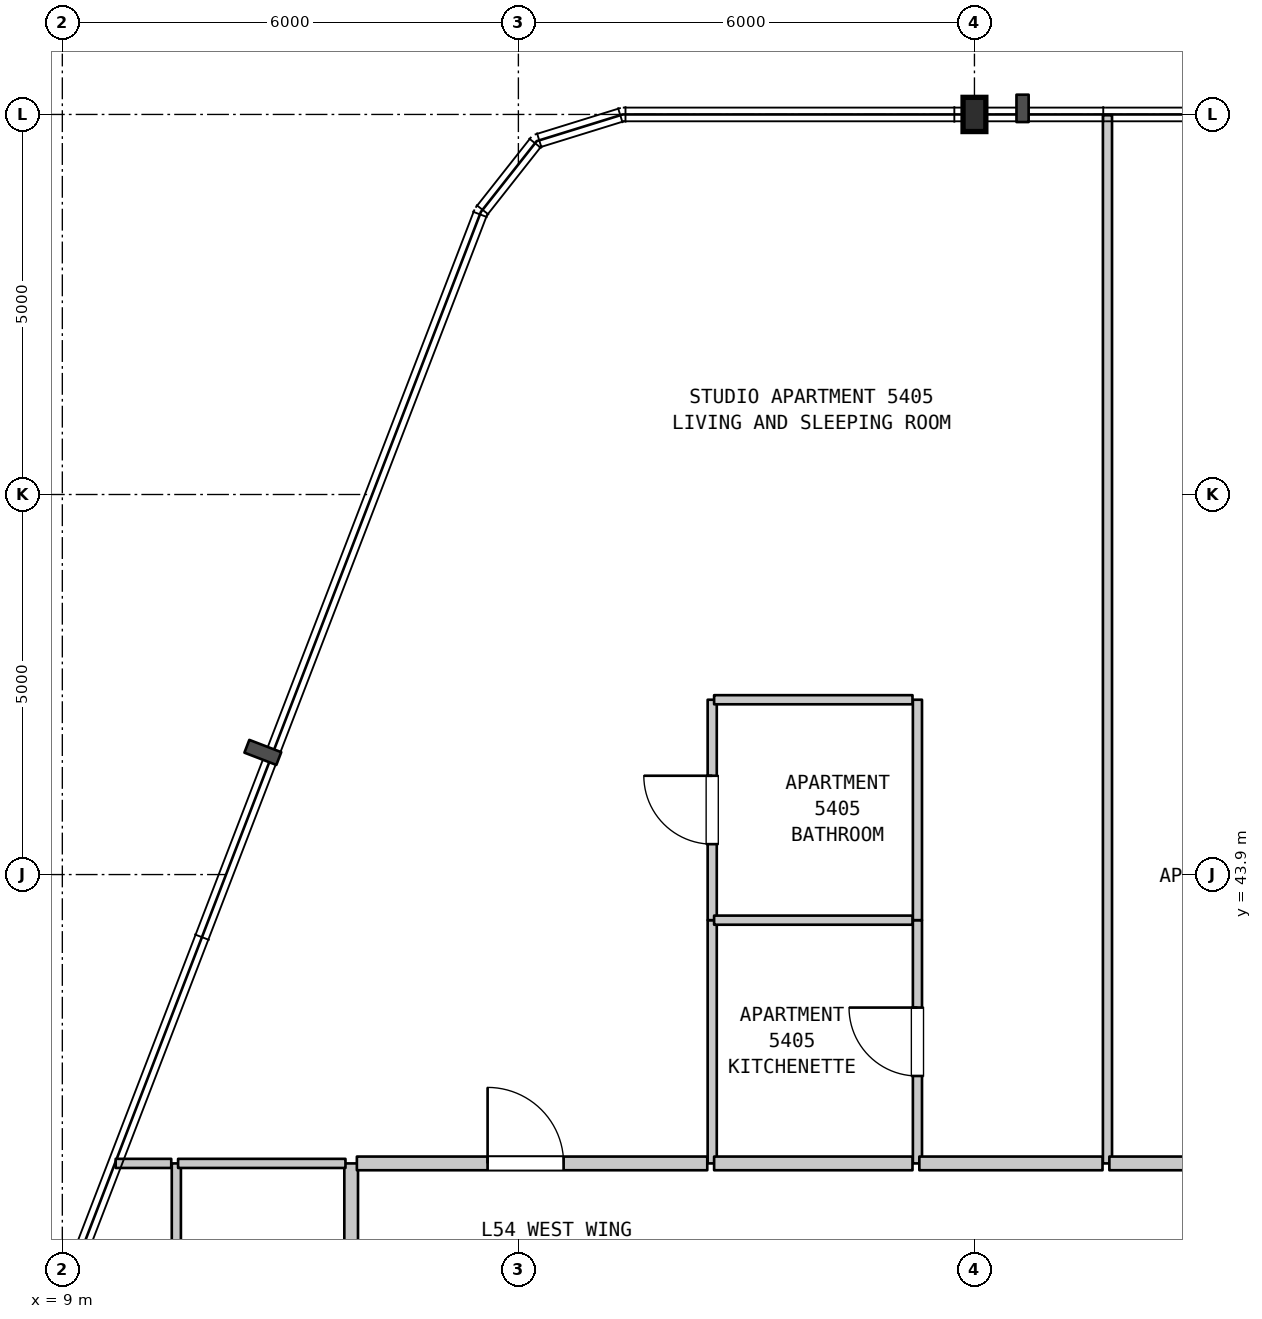
"""IFC4 building model, lengths in metres.
Left out: names, types, materials, properties, quantities, classifications, styles, units other than length and angle.
Written with IfcOpenShell. Run it as: python <this file> out.ifc"""

import sys

from ifc_helpers import new_model, si_unit, direction, frame, frame_2d, origin, origin_2d, place, context, subcontext, project, spatial, rectangle, i_section, extrude, element, fill, save


model = new_model("IFC4")
c1 = context("Model", 3, precision=1e-05, world=origin(), true_north=direction((0.0, 1.0)))
c2 = subcontext(c1, "Body", "Model", "MODEL_VIEW")
j1 = project(units=[si_unit("LENGTHUNIT", "METRE"), si_unit("PLANEANGLEUNIT", "RADIAN")], contexts=[c1])
p1 = place(None, origin())
s1 = spatial("IfcSite", under=j1, at=p1, CompositionType="ELEMENT")
p2 = place(p1, origin())
s2 = spatial("IfcBuilding", under=s1, at=p2, CompositionType="ELEMENT")
p3 = place(p2, frame((0.0, 0.0, 218.0)))
s3 = spatial("IfcBuildingStorey", under=s2, at=p3, CompositionType="ELEMENT", Elevation=218.0)
p4 = place(p3, frame((21.0, 53.9, 0.0), z_axis=(0.0, 0.0, 1.0), x_axis=(1.0, 0.0, 0.0)))
e1 = element("IfcColumn", 1, at=p4, inside=s3, PredefinedType="COLUMN", context=c2, shape_type="SweptSolid", body=[
    extrude(i_section(OverallWidth=0.3, OverallDepth=0.45, WebThickness=0.014, FlangeThickness=0.026, FilletRadius=0.027, at=origin_2d()), origin(), (0.0, 0.0, 1.0), 4.8),
])
p5 = place(p3, frame((10.5, 31.45, 0.0), z_axis=(0.0, 0.0, 1.0), x_axis=(0.0, 1.0, 0.0)))
e2 = element("IfcWall", 2, at=p5, inside=s3, PredefinedType="PARTITIONING", context=c2, shape_type="SweptSolid", body=[
    extrude(rectangle(XDim=8.65, YDim=0.12, at=frame_2d((4.325, 0.0))), origin(), (0.0, 0.0, 1.0), 4.49),
])
p6 = place(p3, frame((12.8, 31.45, 0.0), z_axis=(0.0, 0.0, 1.0), x_axis=(0.0, 1.0, 0.0)))
e3 = element("IfcWall", 3, at=p6, inside=s3, PredefinedType="STANDARD", context=c2, shape_type="SweptSolid", body=[
    extrude(rectangle(XDim=8.65, YDim=0.18, at=frame_2d((4.325, 0.0))), origin(), (0.0, 0.0, 1.0), 4.49),
])
p7 = place(p3, frame((17.55, 40.1, 0.0), z_axis=(0.0, 0.0, 1.0), x_axis=(0.0, 1.0, 0.0)))
e4 = element("IfcWall", 4, at=p7, inside=s3, PredefinedType="PARTITIONING", context=c2, shape_type="SweptSolid", body=[
    extrude(rectangle(XDim=3.2, YDim=0.12, at=frame_2d((1.6, 0.0))), origin(), (0.0, 0.0, 1.0), 4.49),
])
p8 = place(p3, frame((17.55, 43.3, 0.0), z_axis=(0.0, 0.0, 1.0), x_axis=(0.0, 1.0, 0.0)))
e5 = element("IfcWall", 5, at=p8, inside=s3, PredefinedType="PARTITIONING", context=c2, shape_type="SweptSolid", body=[
    extrude(rectangle(XDim=2.9, YDim=0.12, at=frame_2d((1.45, 0.0))), origin(), (0.0, 0.0, 1.0), 4.49),
])
p9 = place(p8, frame((1.0, 0.0, 0.0)))
e6 = element("IfcOpeningElement", 6, at=p9, cuts=e5, PredefinedType="OPENING", context=c2, shape_type="SweptSolid", body=[
    extrude(rectangle(XDim=0.9, YDim=2.1, at=frame_2d((0.45, 1.05))), frame((0.0, 0.07, 0.0), z_axis=(0.0, -1.0, 0.0), x_axis=(1.0, 0.0, 0.0)), (0.0, 0.0, 1.0), 0.14),
])
p10 = place(p3, frame((20.25, 40.1, 0.0), z_axis=(0.0, 0.0, 1.0), x_axis=(0.0, 1.0, 0.0)))
e7 = element("IfcWall", 7, at=p10, inside=s3, PredefinedType="PARTITIONING", context=c2, shape_type="SweptSolid", body=[
    extrude(rectangle(XDim=3.2, YDim=0.12, at=frame_2d((1.6, 0.0))), origin(), (0.0, 0.0, 1.0), 4.49),
])
p11 = place(p10, frame((1.15, 0.0, 0.0)))
e8 = element("IfcOpeningElement", 8, at=p11, cuts=e7, PredefinedType="OPENING", context=c2, shape_type="SweptSolid", body=[
    extrude(rectangle(XDim=0.9, YDim=2.15, at=frame_2d((0.45, 1.075))), frame((0.0, 0.07, 0.0), z_axis=(0.0, -1.0, 0.0), x_axis=(1.0, 0.0, 0.0)), (0.0, 0.0, 1.0), 0.14),
])
p12 = place(p3, frame((20.25, 43.3, 0.0), z_axis=(0.0, 0.0, 1.0), x_axis=(0.0, 1.0, 0.0)))
e9 = element("IfcWall", 9, at=p12, inside=s3, PredefinedType="PARTITIONING", context=c2, shape_type="SweptSolid", body=[
    extrude(rectangle(XDim=2.9, YDim=0.12, at=frame_2d((1.45, 0.0))), origin(), (0.0, 0.0, 1.0), 4.49),
])
p13 = place(p3, frame((22.75, 40.1, 0.0), z_axis=(0.0, 0.0, 1.0), x_axis=(0.0, 1.0, 0.0)))
e10 = element("IfcWall", 10, at=p13, inside=s3, PredefinedType="PARTITIONING", context=c2, shape_type="SweptSolid", body=[
    extrude(rectangle(XDim=13.79, YDim=0.12, at=frame_2d((6.895, 0.0))), origin(), (0.0, 0.0, 1.0), 4.49),
])
p14 = place(p3, frame((9.702, 40.1, 0.0), z_axis=(0.0, 0.0, 1.0), x_axis=(1.0, 0.0, 0.0)))
e11 = element("IfcWall", 11, at=p14, inside=s3, PredefinedType="PARTITIONING", context=c2, shape_type="SweptSolid", body=[
    extrude(rectangle(XDim=0.731, YDim=0.12, at=frame_2d((0.366, 0.0))), origin(), (0.0, 0.0, 1.0), 4.49),
])
p15 = place(p3, frame((10.523, 40.1, 0.0), z_axis=(0.0, 0.0, 1.0), x_axis=(1.0, 0.0, 0.0)))
e12 = element("IfcWall", 12, at=p15, inside=s3, PredefinedType="PARTITIONING", context=c2, shape_type="SweptSolid", body=[
    extrude(rectangle(XDim=2.202, YDim=0.12, at=frame_2d((1.101, 0.0))), origin(), (0.0, 0.0, 1.0), 4.49),
])
p16 = place(p3, frame((12.875, 40.1, 0.0), z_axis=(0.0, 0.0, 1.0), x_axis=(1.0, 0.0, 0.0)))
e13 = element("IfcWall", 13, at=p16, inside=s3, PredefinedType="STANDARD", context=c2, shape_type="SweptSolid", body=[
    extrude(rectangle(XDim=4.61, YDim=0.18, at=frame_2d((2.305, 0.0))), origin(), (0.0, 0.0, 1.0), 4.49),
])
p17 = place(p16, frame((1.72, 0.0, 0.0)))
e14 = element("IfcOpeningElement", 14, at=p17, cuts=e13, PredefinedType="OPENING", context=c2, shape_type="SweptSolid", body=[
    extrude(rectangle(XDim=1.0, YDim=2.15, at=frame_2d((0.5, 1.075))), frame((0.0, 0.1, 0.0), z_axis=(0.0, -1.0, 0.0), x_axis=(1.0, 0.0, 0.0)), (0.0, 0.0, 1.0), 0.2),
])
p18 = place(p3, frame((17.575, 40.1, 0.0), z_axis=(0.0, 0.0, 1.0), x_axis=(1.0, 0.0, 0.0)))
e15 = element("IfcWall", 15, at=p18, inside=s3, PredefinedType="STANDARD", context=c2, shape_type="SweptSolid", body=[
    extrude(rectangle(XDim=2.61, YDim=0.18, at=frame_2d((1.305, 0.0))), origin(), (0.0, 0.0, 1.0), 4.49),
])
p19 = place(p3, frame((20.275, 40.1, 0.0), z_axis=(0.0, 0.0, 1.0), x_axis=(1.0, 0.0, 0.0)))
e16 = element("IfcWall", 16, at=p19, inside=s3, PredefinedType="STANDARD", context=c2, shape_type="SweptSolid", body=[
    extrude(rectangle(XDim=2.41, YDim=0.18, at=frame_2d((1.205, 0.0))), origin(), (0.0, 0.0, 1.0), 4.49),
])
p20 = place(p3, frame((22.775, 40.1, 0.0), z_axis=(0.0, 0.0, 1.0), x_axis=(1.0, 0.0, 0.0)))
e17 = element("IfcWall", 17, at=p20, inside=s3, PredefinedType="STANDARD", context=c2, shape_type="SweptSolid", body=[
    extrude(rectangle(XDim=4.07, YDim=0.18, at=frame_2d((2.035, 0.0))), origin(), (0.0, 0.0, 1.0), 4.49),
])
p21 = place(p20, frame((1.535, 0.0, 0.0)))
e18 = element("IfcOpeningElement", 18, at=p21, cuts=e17, PredefinedType="OPENING", context=c2, shape_type="SweptSolid", body=[
    extrude(rectangle(XDim=1.0, YDim=2.15, at=frame_2d((0.5, 1.075))), frame((0.0, 0.1, 0.0), z_axis=(0.0, -1.0, 0.0), x_axis=(1.0, 0.0, 0.0)), (0.0, 0.0, 1.0), 0.2),
])
for number, where, z_axis, x_axis in (
    (19, (17.575, 43.3, 0.0), (0.0, 0.0, 1.0), (1.0, 0.0, 0.0)),
    (20, (17.575, 46.2, 0.0), (0.0, 0.0, 1.0), (1.0, 0.0, 0.0)),
):
    element("IfcWall", number, at=place(p3, frame(where, z_axis=z_axis, x_axis=x_axis)), inside=s3, PredefinedType="PARTITIONING", context=c2, shape_type="SweptSolid", body=[
        extrude(rectangle(XDim=2.61, YDim=0.12, at=frame_2d((1.305, 0.0))), origin(), (0.0, 0.0, 1.0), 4.49),
    ])
p22 = place(p9, origin())
e21 = element("IfcDoor", 21, at=p22, inside=s3, OperationType="SINGLE_SWING_RIGHT", PredefinedType="DOOR", context=c2, shape_type="SweptSolid", body=[
    extrude(rectangle(XDim=0.9, YDim=2.1, at=frame_2d((0.45, 1.05))), frame((0.0, 0.025, 0.0), z_axis=(0.0, -1.0, 0.0), x_axis=(1.0, 0.0, 0.0)), (0.0, 0.0, 1.0), 0.05),
])
fill(e6, e21)
p23 = place(p11, origin())
e22 = element("IfcDoor", 22, at=p23, inside=s3, OperationType="SINGLE_SWING_RIGHT", PredefinedType="DOOR", context=c2, shape_type="SweptSolid", body=[
    extrude(rectangle(XDim=0.9, YDim=2.15, at=frame_2d((0.45, 1.075))), frame((0.0, 0.025, 0.0), z_axis=(0.0, -1.0, 0.0), x_axis=(1.0, 0.0, 0.0)), (0.0, 0.0, 1.0), 0.05),
])
fill(e8, e22)
p24 = place(p17, origin())
e23 = element("IfcDoor", 23, at=p24, inside=s3, OperationType="SINGLE_SWING_LEFT", PredefinedType="DOOR", context=c2, shape_type="SweptSolid", body=[
    extrude(rectangle(XDim=1.0, YDim=2.15, at=frame_2d((0.5, 1.075))), frame((0.0, 0.025, 0.0), z_axis=(0.0, -1.0, 0.0), x_axis=(1.0, 0.0, 0.0)), (0.0, 0.0, 1.0), 0.05),
])
fill(e14, e23)
save(model, sys.argv[1])
